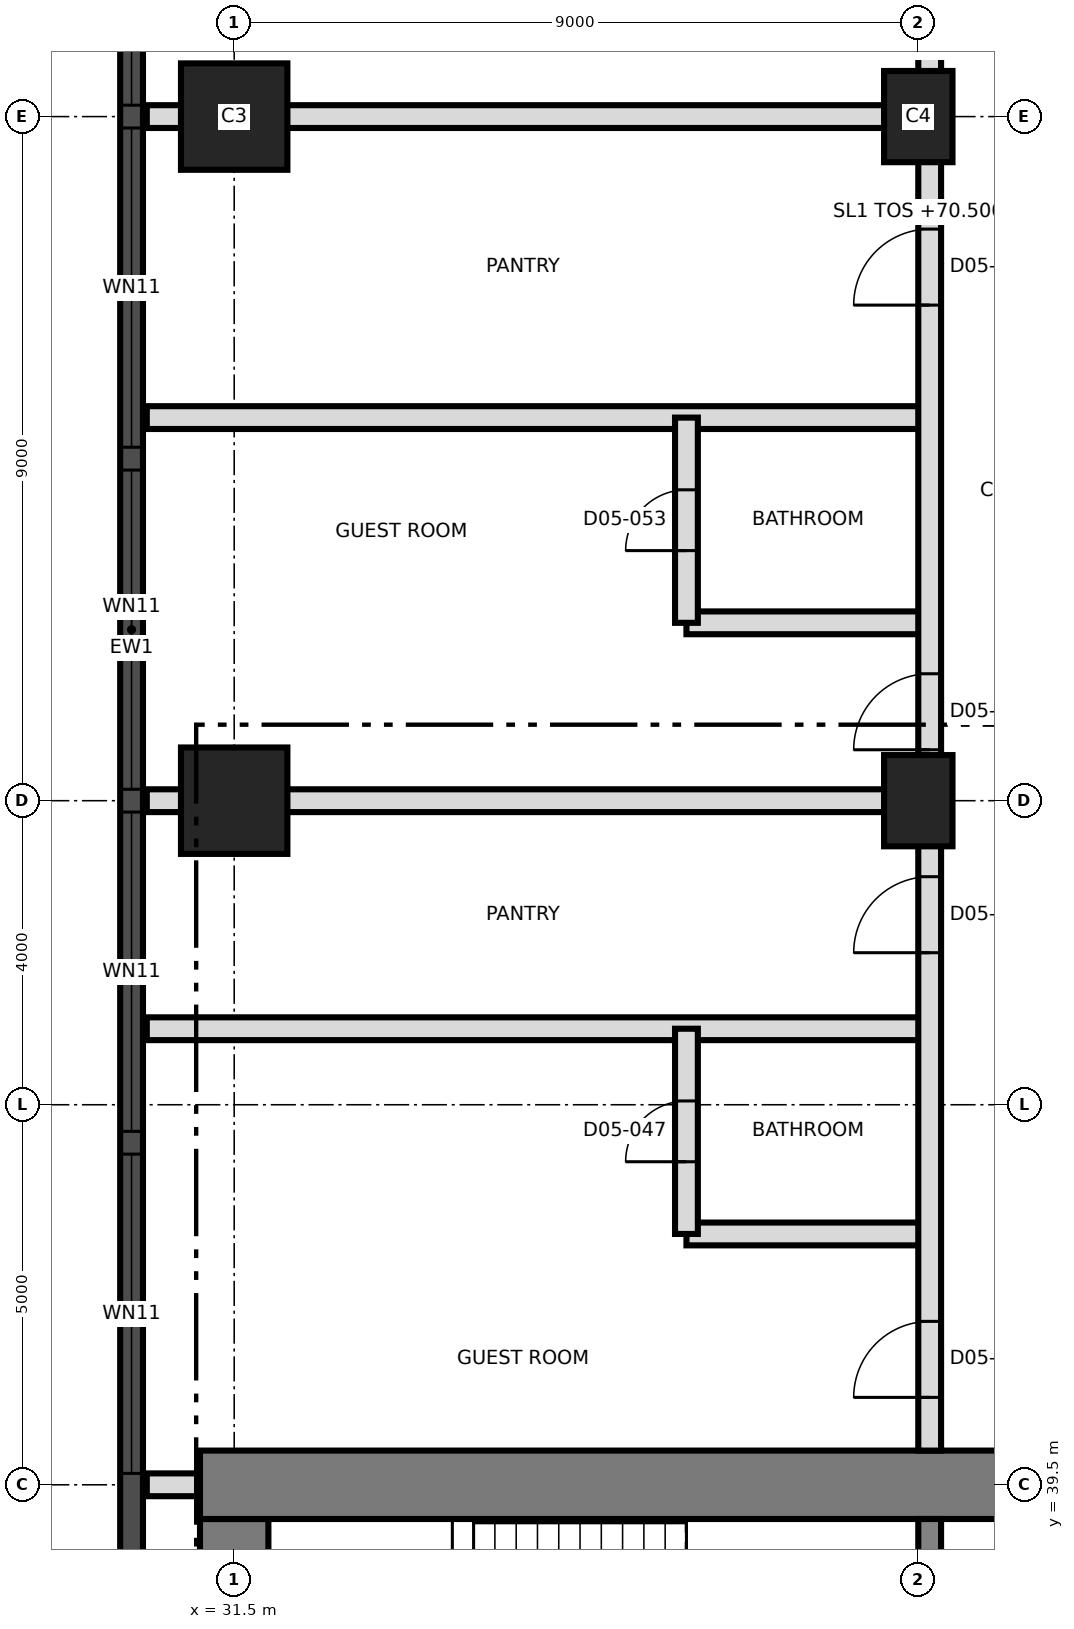
"""IFC4 building model, lengths in metres.
Left out: names, types, materials, properties, quantities, classifications, styles, units other than length and angle.
Written with IfcOpenShell. Run it as: python <this file> out.ifc"""

import sys

from ifc_helpers import new_model, si_unit, direction, frame, frame_2d, origin, origin_2d, place, context, subcontext, project, spatial, rectangle, extrude, element, fill, save


model = new_model("IFC4")
c1 = context("Model", 3, precision=1e-05, world=origin(), true_north=direction((0.0, 1.0)))
c2 = subcontext(c1, "Body", "Model", "MODEL_VIEW")
j1 = project(units=[si_unit("LENGTHUNIT", "METRE"), si_unit("PLANEANGLEUNIT", "RADIAN")], contexts=[c1])
p1 = place(None, origin())
s1 = spatial("IfcSite", under=j1, at=p1, CompositionType="ELEMENT")
p2 = place(p1, origin())
s2 = spatial("IfcBuilding", under=s1, at=p2, CompositionType="ELEMENT")
p3 = place(p2, frame((0.0, 0.0, 70.5)))
s3 = spatial("IfcBuildingStorey", under=s2, at=p3, CompositionType="ELEMENT", Elevation=70.5)
p4 = place(p3, frame((31.5, 21.95, 0.0), z_axis=(0.0, 0.0, 1.0), x_axis=(0.0, 1.0, 0.0)))
e1 = element("IfcWall", 1, at=p4, inside=s3, PredefinedType="SHEAR", context=c2, shape_type="SweptSolid", body=[
    extrude(rectangle(XDim=17.1, YDim=0.9, at=frame_2d((8.55, 0.0))), origin(), (0.0, 0.0, 1.0), 3.7),
])
p5 = place(p3, frame((31.05, 39.5, 0.0), z_axis=(0.0, 0.0, 1.0), x_axis=(1.0, 0.0, 0.0)))
e2 = element("IfcWall", 2, at=p5, inside=s3, PredefinedType="SHEAR", context=c2, shape_type="SweptSolid", body=[
    extrude(rectangle(XDim=27.0, YDim=0.9, at=frame_2d((13.5, 0.0))), origin(), (0.0, 0.0, 1.0), 3.7),
])
p6 = place(p5, frame((10.65, 0.0, 0.0)))
e3 = element("IfcOpeningElement", 3, at=p6, cuts=e2, PredefinedType="OPENING", context=c2, shape_type="SweptSolid", body=[
    extrude(rectangle(XDim=1.2, YDim=2.1, at=frame_2d((0.6, 1.05))), frame((0.0, 0.46, 0.0), z_axis=(0.0, -1.0, 0.0), x_axis=(1.0, 0.0, 0.0)), (0.0, 0.0, 1.0), 0.92),
])
p7 = place(p3, frame((40.65, 33.5, 0.0), z_axis=(0.0, 0.0, 1.0), x_axis=(0.0, 1.0, 0.0)))
e4 = element("IfcWall", 4, at=p7, inside=s3, PredefinedType="SHEAR", context=c2, shape_type="SweptSolid", body=[
    extrude(rectangle(XDim=5.55, YDim=0.3, at=frame_2d((2.775, 0.0))), origin(), (0.0, 0.0, 1.0), 3.7),
])
p8 = place(p3, frame((31.5, 48.5, 0.0), z_axis=(0.0, 0.0, 1.0), x_axis=(1.0, 0.0, 0.0)))
e5 = element("IfcColumn", 5, at=p8, inside=s3, PredefinedType="COLUMN", context=c2, shape_type="SweptSolid", body=[
    extrude(rectangle(XDim=1.4, YDim=1.4, at=origin_2d()), origin(), (0.0, 0.0, 1.0), 3.7),
])
p9 = place(p3, frame((40.5, 48.5, 0.0), z_axis=(0.0, 0.0, 1.0), x_axis=(0.0, 1.0, 0.0)))
e6 = element("IfcColumn", 6, at=p9, inside=s3, PredefinedType="COLUMN", context=c2, shape_type="SweptSolid", body=[
    extrude(rectangle(XDim=1.2, YDim=0.9, at=origin_2d()), origin(), (0.0, 0.0, 1.0), 3.7),
])
p10 = place(p3, frame((31.5, 57.5, 0.0), z_axis=(0.0, 0.0, 1.0), x_axis=(1.0, 0.0, 0.0)))
e7 = element("IfcColumn", 7, at=p10, inside=s3, PredefinedType="COLUMN", context=c2, shape_type="SweptSolid", body=[
    extrude(rectangle(XDim=1.4, YDim=1.4, at=origin_2d()), origin(), (0.0, 0.0, 1.0), 3.7),
])
p11 = place(p3, frame((40.5, 57.5, 0.0), z_axis=(0.0, 0.0, 1.0), x_axis=(0.0, 1.0, 0.0)))
e8 = element("IfcColumn", 8, at=p11, inside=s3, PredefinedType="COLUMN", context=c2, shape_type="SweptSolid", body=[
    extrude(rectangle(XDim=1.2, YDim=0.9, at=origin_2d()), origin(), (0.0, 0.0, 1.0), 3.7),
])
p12 = place(p3, frame((30.15, 66.992, 0.0), z_axis=(0.0, 0.0, 1.0), x_axis=(0.0, -1.0, 0.0)))
e9 = element("IfcWall", 9, at=p12, inside=s3, PredefinedType="SOLIDWALL", context=c2, shape_type="SweptSolid", body=[
    extrude(rectangle(XDim=32.968, YDim=0.3, at=frame_2d((16.484, 0.0))), origin(), (0.0, 0.0, 1.0), 3.4),
])
p13 = place(p12, frame((1.596, 0.0, 0.3)))
e10 = element("IfcOpeningElement", 10, at=p13, cuts=e9, PredefinedType="OPENING", context=c2, shape_type="SweptSolid", body=[
    extrude(rectangle(XDim=1.8, YDim=2.4, at=frame_2d((0.9, 1.2))), frame((0.0, 0.16, 0.0), z_axis=(0.0, -1.0, 0.0), x_axis=(1.0, 0.0, 0.0)), (0.0, 0.0, 1.0), 0.32),
])
p14 = place(p12, frame((5.142, 0.0, 0.9)))
e11 = element("IfcOpeningElement", 11, at=p14, cuts=e9, PredefinedType="OPENING", context=c2, shape_type="SweptSolid", body=[
    extrude(rectangle(XDim=4.2, YDim=1.5, at=frame_2d((2.1, 0.75))), frame((0.0, 0.16, 0.0), z_axis=(0.0, -1.0, 0.0), x_axis=(1.0, 0.0, 0.0)), (0.0, 0.0, 1.0), 0.32),
])
p15 = place(p12, frame((9.642, 0.0, 0.9)))
e12 = element("IfcOpeningElement", 12, at=p15, cuts=e9, PredefinedType="OPENING", context=c2, shape_type="SweptSolid", body=[
    extrude(rectangle(XDim=4.2, YDim=1.5, at=frame_2d((2.1, 0.75))), frame((0.0, 0.16, 0.0), z_axis=(0.0, -1.0, 0.0), x_axis=(1.0, 0.0, 0.0)), (0.0, 0.0, 1.0), 0.32),
])
p16 = place(p12, frame((14.142, 0.0, 0.9)))
e13 = element("IfcOpeningElement", 13, at=p16, cuts=e9, PredefinedType="OPENING", context=c2, shape_type="SweptSolid", body=[
    extrude(rectangle(XDim=4.2, YDim=1.5, at=frame_2d((2.1, 0.75))), frame((0.0, 0.16, 0.0), z_axis=(0.0, -1.0, 0.0), x_axis=(1.0, 0.0, 0.0)), (0.0, 0.0, 1.0), 0.32),
])
p17 = place(p12, frame((18.642, 0.0, 0.9)))
e14 = element("IfcOpeningElement", 14, at=p17, cuts=e9, PredefinedType="OPENING", context=c2, shape_type="SweptSolid", body=[
    extrude(rectangle(XDim=4.2, YDim=1.5, at=frame_2d((2.1, 0.75))), frame((0.0, 0.16, 0.0), z_axis=(0.0, -1.0, 0.0), x_axis=(1.0, 0.0, 0.0)), (0.0, 0.0, 1.0), 0.32),
])
p18 = place(p12, frame((23.142, 0.0, 0.9)))
e15 = element("IfcOpeningElement", 15, at=p18, cuts=e9, PredefinedType="OPENING", context=c2, shape_type="SweptSolid", body=[
    extrude(rectangle(XDim=4.2, YDim=1.5, at=frame_2d((2.1, 0.75))), frame((0.0, 0.16, 0.0), z_axis=(0.0, -1.0, 0.0), x_axis=(1.0, 0.0, 0.0)), (0.0, 0.0, 1.0), 0.32),
])
p19 = place(p12, frame((29.33, 0.0, 0.3)))
e16 = element("IfcOpeningElement", 16, at=p19, cuts=e9, PredefinedType="OPENING", context=c2, shape_type="SweptSolid", body=[
    extrude(rectangle(XDim=1.8, YDim=2.4, at=frame_2d((0.9, 1.2))), frame((0.0, 0.16, 0.0), z_axis=(0.0, -1.0, 0.0), x_axis=(1.0, 0.0, 0.0)), (0.0, 0.0, 1.0), 0.32),
])
p20 = place(p3, frame((30.35, 39.5, 0.0), z_axis=(0.0, 0.0, 1.0), x_axis=(1.0, 0.0, 0.0)))
e17 = element("IfcWall", 17, at=p20, inside=s3, PredefinedType="PARTITIONING", context=c2, shape_type="SweptSolid", body=[
    extrude(rectangle(XDim=0.68, YDim=0.3, at=frame_2d((0.34, 0.0))), origin(), (0.0, 0.0, 1.0), 3.4),
])
p21 = place(p3, frame((37.45, 42.8, 0.0), z_axis=(0.0, 0.0, 1.0), x_axis=(1.0, 0.0, 0.0)))
e18 = element("IfcWall", 18, at=p21, inside=s3, PredefinedType="PARTITIONING", context=c2, shape_type="SweptSolid", body=[
    extrude(rectangle(XDim=3.2, YDim=0.3, at=frame_2d((1.6, 0.0))), origin(), (0.0, 0.0, 1.0), 3.4),
])
for number, where, z_axis, x_axis in (
    (19, (30.35, 45.5, 0.0), (0.0, 0.0, 1.0), (1.0, 0.0, 0.0)),
    (20, (30.35, 48.5, 0.0), (0.0, 0.0, 1.0), (1.0, 0.0, 0.0)),
):
    element("IfcWall", number, at=place(p3, frame(where, z_axis=z_axis, x_axis=x_axis)), inside=s3, PredefinedType="PARTITIONING", context=c2, shape_type="SweptSolid", body=[
        extrude(rectangle(XDim=10.3, YDim=0.3, at=frame_2d((5.15, 0.0))), origin(), (0.0, 0.0, 1.0), 3.4),
    ])
p22 = place(p3, frame((37.45, 50.84, 0.0), z_axis=(0.0, 0.0, 1.0), x_axis=(1.0, 0.0, 0.0)))
e21 = element("IfcWall", 21, at=p22, inside=s3, PredefinedType="PARTITIONING", context=c2, shape_type="SweptSolid", body=[
    extrude(rectangle(XDim=3.2, YDim=0.3, at=frame_2d((1.6, 0.0))), origin(), (0.0, 0.0, 1.0), 3.4),
])
for number, where, z_axis, x_axis in (
    (22, (30.35, 53.54, 0.0), (0.0, 0.0, 1.0), (1.0, 0.0, 0.0)),
    (23, (30.35, 57.5, 0.0), (0.0, 0.0, 1.0), (1.0, 0.0, 0.0)),
):
    element("IfcWall", number, at=place(p3, frame(where, z_axis=z_axis, x_axis=x_axis)), inside=s3, PredefinedType="PARTITIONING", context=c2, shape_type="SweptSolid", body=[
        extrude(rectangle(XDim=10.3, YDim=0.3, at=frame_2d((5.15, 0.0))), origin(), (0.0, 0.0, 1.0), 3.4),
    ])
p23 = place(p3, frame((37.45, 42.8, 0.0), z_axis=(0.0, 0.0, 1.0), x_axis=(0.0, 1.0, 0.0)))
e24 = element("IfcWall", 24, at=p23, inside=s3, PredefinedType="PARTITIONING", context=c2, shape_type="SweptSolid", body=[
    extrude(rectangle(XDim=2.7, YDim=0.3, at=frame_2d((1.35, 0.0))), origin(), (0.0, 0.0, 1.0), 3.4),
])
p24 = place(p23, frame((0.95, 0.0, 0.0)))
e25 = element("IfcOpeningElement", 25, at=p24, cuts=e24, PredefinedType="OPENING", context=c2, shape_type="SweptSolid", body=[
    extrude(rectangle(XDim=0.8, YDim=2.1, at=frame_2d((0.4, 1.05))), frame((0.0, 0.16, 0.0), z_axis=(0.0, -1.0, 0.0), x_axis=(1.0, 0.0, 0.0)), (0.0, 0.0, 1.0), 0.32),
])
p25 = place(p3, frame((37.45, 50.84, 0.0), z_axis=(0.0, 0.0, 1.0), x_axis=(0.0, 1.0, 0.0)))
e26 = element("IfcWall", 26, at=p25, inside=s3, PredefinedType="PARTITIONING", context=c2, shape_type="SweptSolid", body=[
    extrude(rectangle(XDim=2.7, YDim=0.3, at=frame_2d((1.35, 0.0))), origin(), (0.0, 0.0, 1.0), 3.4),
])
p26 = place(p25, frame((0.95, 0.0, 0.0)))
e27 = element("IfcOpeningElement", 27, at=p26, cuts=e26, PredefinedType="OPENING", context=c2, shape_type="SweptSolid", body=[
    extrude(rectangle(XDim=0.8, YDim=2.1, at=frame_2d((0.4, 1.05))), frame((0.0, 0.16, 0.0), z_axis=(0.0, -1.0, 0.0), x_axis=(1.0, 0.0, 0.0)), (0.0, 0.0, 1.0), 0.32),
])
p27 = place(p3, frame((40.65, 39.95, 0.0), z_axis=(0.0, 0.0, 1.0), x_axis=(0.0, 1.0, 0.0)))
e28 = element("IfcWall", 28, at=p27, inside=s3, PredefinedType="PARTITIONING", context=c2, shape_type="SweptSolid", body=[
    extrude(rectangle(XDim=36.94, YDim=0.3, at=frame_2d((18.47, 0.0))), origin(), (0.0, 0.0, 1.0), 3.4),
])
p28 = place(p27, frame((0.7, 0.0, 0.0)))
e29 = element("IfcOpeningElement", 29, at=p28, cuts=e28, PredefinedType="OPENING", context=c2, shape_type="SweptSolid", body=[
    extrude(rectangle(XDim=1.0, YDim=2.1, at=frame_2d((0.5, 1.05))), frame((0.0, 0.16, 0.0), z_axis=(0.0, -1.0, 0.0), x_axis=(1.0, 0.0, 0.0)), (0.0, 0.0, 1.0), 0.32),
])
p29 = place(p27, frame((6.55, 0.0, 0.0)))
e30 = element("IfcOpeningElement", 30, at=p29, cuts=e28, PredefinedType="OPENING", context=c2, shape_type="SweptSolid", body=[
    extrude(rectangle(XDim=1.0, YDim=2.1, at=frame_2d((0.5, 1.05))), frame((0.0, 0.16, 0.0), z_axis=(0.0, -1.0, 0.0), x_axis=(1.0, 0.0, 0.0)), (0.0, 0.0, 1.0), 0.32),
])
p30 = place(p27, frame((9.22, 0.0, 0.0)))
e31 = element("IfcOpeningElement", 31, at=p30, cuts=e28, PredefinedType="OPENING", context=c2, shape_type="SweptSolid", body=[
    extrude(rectangle(XDim=1.0, YDim=2.1, at=frame_2d((0.5, 1.05))), frame((0.0, 0.16, 0.0), z_axis=(0.0, -1.0, 0.0), x_axis=(1.0, 0.0, 0.0)), (0.0, 0.0, 1.0), 0.32),
])
p31 = place(p27, frame((15.07, 0.0, 0.0)))
e32 = element("IfcOpeningElement", 32, at=p31, cuts=e28, PredefinedType="OPENING", context=c2, shape_type="SweptSolid", body=[
    extrude(rectangle(XDim=1.0, YDim=2.1, at=frame_2d((0.5, 1.05))), frame((0.0, 0.16, 0.0), z_axis=(0.0, -1.0, 0.0), x_axis=(1.0, 0.0, 0.0)), (0.0, 0.0, 1.0), 0.32),
])
p32 = place(p27, frame((21.05, 0.0, 0.0)))
e33 = element("IfcOpeningElement", 33, at=p32, cuts=e28, PredefinedType="OPENING", context=c2, shape_type="SweptSolid", body=[
    extrude(rectangle(XDim=1.0, YDim=2.4, at=frame_2d((0.5, 1.2))), frame((0.0, 0.16, 0.0), z_axis=(0.0, -1.0, 0.0), x_axis=(1.0, 0.0, 0.0)), (0.0, 0.0, 1.0), 0.32),
])
p33 = place(p14, origin())
e34 = element("IfcWindow", 34, at=p33, inside=s3, PartitioningType="SINGLE_PANEL", PredefinedType="WINDOW", context=c2, shape_type="SweptSolid", body=[
    extrude(rectangle(XDim=4.2, YDim=1.5, at=frame_2d((2.1, 0.75))), frame((0.0, 0.03, 0.0), z_axis=(0.0, -1.0, 0.0), x_axis=(1.0, 0.0, 0.0)), (0.0, 0.0, 1.0), 0.06),
])
fill(e11, e34)
p34 = place(p15, origin())
e35 = element("IfcWindow", 35, at=p34, inside=s3, PartitioningType="SINGLE_PANEL", PredefinedType="WINDOW", context=c2, shape_type="SweptSolid", body=[
    extrude(rectangle(XDim=4.2, YDim=1.5, at=frame_2d((2.1, 0.75))), frame((0.0, 0.03, 0.0), z_axis=(0.0, -1.0, 0.0), x_axis=(1.0, 0.0, 0.0)), (0.0, 0.0, 1.0), 0.06),
])
fill(e12, e35)
p35 = place(p16, origin())
e36 = element("IfcWindow", 36, at=p35, inside=s3, PartitioningType="SINGLE_PANEL", PredefinedType="WINDOW", context=c2, shape_type="SweptSolid", body=[
    extrude(rectangle(XDim=4.2, YDim=1.5, at=frame_2d((2.1, 0.75))), frame((0.0, 0.03, 0.0), z_axis=(0.0, -1.0, 0.0), x_axis=(1.0, 0.0, 0.0)), (0.0, 0.0, 1.0), 0.06),
])
fill(e13, e36)
p36 = place(p17, origin())
e37 = element("IfcWindow", 37, at=p36, inside=s3, PartitioningType="SINGLE_PANEL", PredefinedType="WINDOW", context=c2, shape_type="SweptSolid", body=[
    extrude(rectangle(XDim=4.2, YDim=1.5, at=frame_2d((2.1, 0.75))), frame((0.0, 0.03, 0.0), z_axis=(0.0, -1.0, 0.0), x_axis=(1.0, 0.0, 0.0)), (0.0, 0.0, 1.0), 0.06),
])
fill(e14, e37)
p37 = place(p18, origin())
e38 = element("IfcWindow", 38, at=p37, inside=s3, PartitioningType="SINGLE_PANEL", PredefinedType="WINDOW", context=c2, shape_type="SweptSolid", body=[
    extrude(rectangle(XDim=4.2, YDim=1.5, at=frame_2d((2.1, 0.75))), frame((0.0, 0.03, 0.0), z_axis=(0.0, -1.0, 0.0), x_axis=(1.0, 0.0, 0.0)), (0.0, 0.0, 1.0), 0.06),
])
fill(e15, e38)
p38 = place(p24, origin())
e39 = element("IfcDoor", 39, at=p38, inside=s3, OperationType="SINGLE_SWING_LEFT", PredefinedType="DOOR", context=c2, shape_type="SweptSolid", body=[
    extrude(rectangle(XDim=0.8, YDim=2.1, at=frame_2d((0.4, 1.05))), frame((0.0, 0.025, 0.0), z_axis=(0.0, -1.0, 0.0), x_axis=(1.0, 0.0, 0.0)), (0.0, 0.0, 1.0), 0.05),
])
fill(e25, e39)
p39 = place(p28, origin())
e40 = element("IfcDoor", 40, at=p39, inside=s3, OperationType="SINGLE_SWING_LEFT", PredefinedType="DOOR", context=c2, shape_type="SweptSolid", body=[
    extrude(rectangle(XDim=1.0, YDim=2.1, at=frame_2d((0.5, 1.05))), frame((0.0, 0.025, 0.0), z_axis=(0.0, -1.0, 0.0), x_axis=(1.0, 0.0, 0.0)), (0.0, 0.0, 1.0), 0.05),
])
fill(e29, e40)
p40 = place(p29, origin())
e41 = element("IfcDoor", 41, at=p40, inside=s3, OperationType="SINGLE_SWING_RIGHT", PredefinedType="DOOR", context=c2, shape_type="SweptSolid", body=[
    extrude(rectangle(XDim=1.0, YDim=2.1, at=frame_2d((0.5, 1.05))), frame((0.0, 0.025, 0.0), z_axis=(0.0, -1.0, 0.0), x_axis=(1.0, 0.0, 0.0)), (0.0, 0.0, 1.0), 0.05),
])
fill(e30, e41)
p41 = place(p26, origin())
e42 = element("IfcDoor", 42, at=p41, inside=s3, OperationType="SINGLE_SWING_LEFT", PredefinedType="DOOR", context=c2, shape_type="SweptSolid", body=[
    extrude(rectangle(XDim=0.8, YDim=2.1, at=frame_2d((0.4, 1.05))), frame((0.0, 0.025, 0.0), z_axis=(0.0, -1.0, 0.0), x_axis=(1.0, 0.0, 0.0)), (0.0, 0.0, 1.0), 0.05),
])
fill(e27, e42)
p42 = place(p30, origin())
e43 = element("IfcDoor", 43, at=p42, inside=s3, OperationType="SINGLE_SWING_LEFT", PredefinedType="DOOR", context=c2, shape_type="SweptSolid", body=[
    extrude(rectangle(XDim=1.0, YDim=2.1, at=frame_2d((0.5, 1.05))), frame((0.0, 0.025, 0.0), z_axis=(0.0, -1.0, 0.0), x_axis=(1.0, 0.0, 0.0)), (0.0, 0.0, 1.0), 0.05),
])
fill(e31, e43)
p43 = place(p31, origin())
e44 = element("IfcDoor", 44, at=p43, inside=s3, OperationType="SINGLE_SWING_RIGHT", PredefinedType="DOOR", context=c2, shape_type="SweptSolid", body=[
    extrude(rectangle(XDim=1.0, YDim=2.1, at=frame_2d((0.5, 1.05))), frame((0.0, 0.025, 0.0), z_axis=(0.0, -1.0, 0.0), x_axis=(1.0, 0.0, 0.0)), (0.0, 0.0, 1.0), 0.05),
])
fill(e32, e44)
save(model, sys.argv[1])
